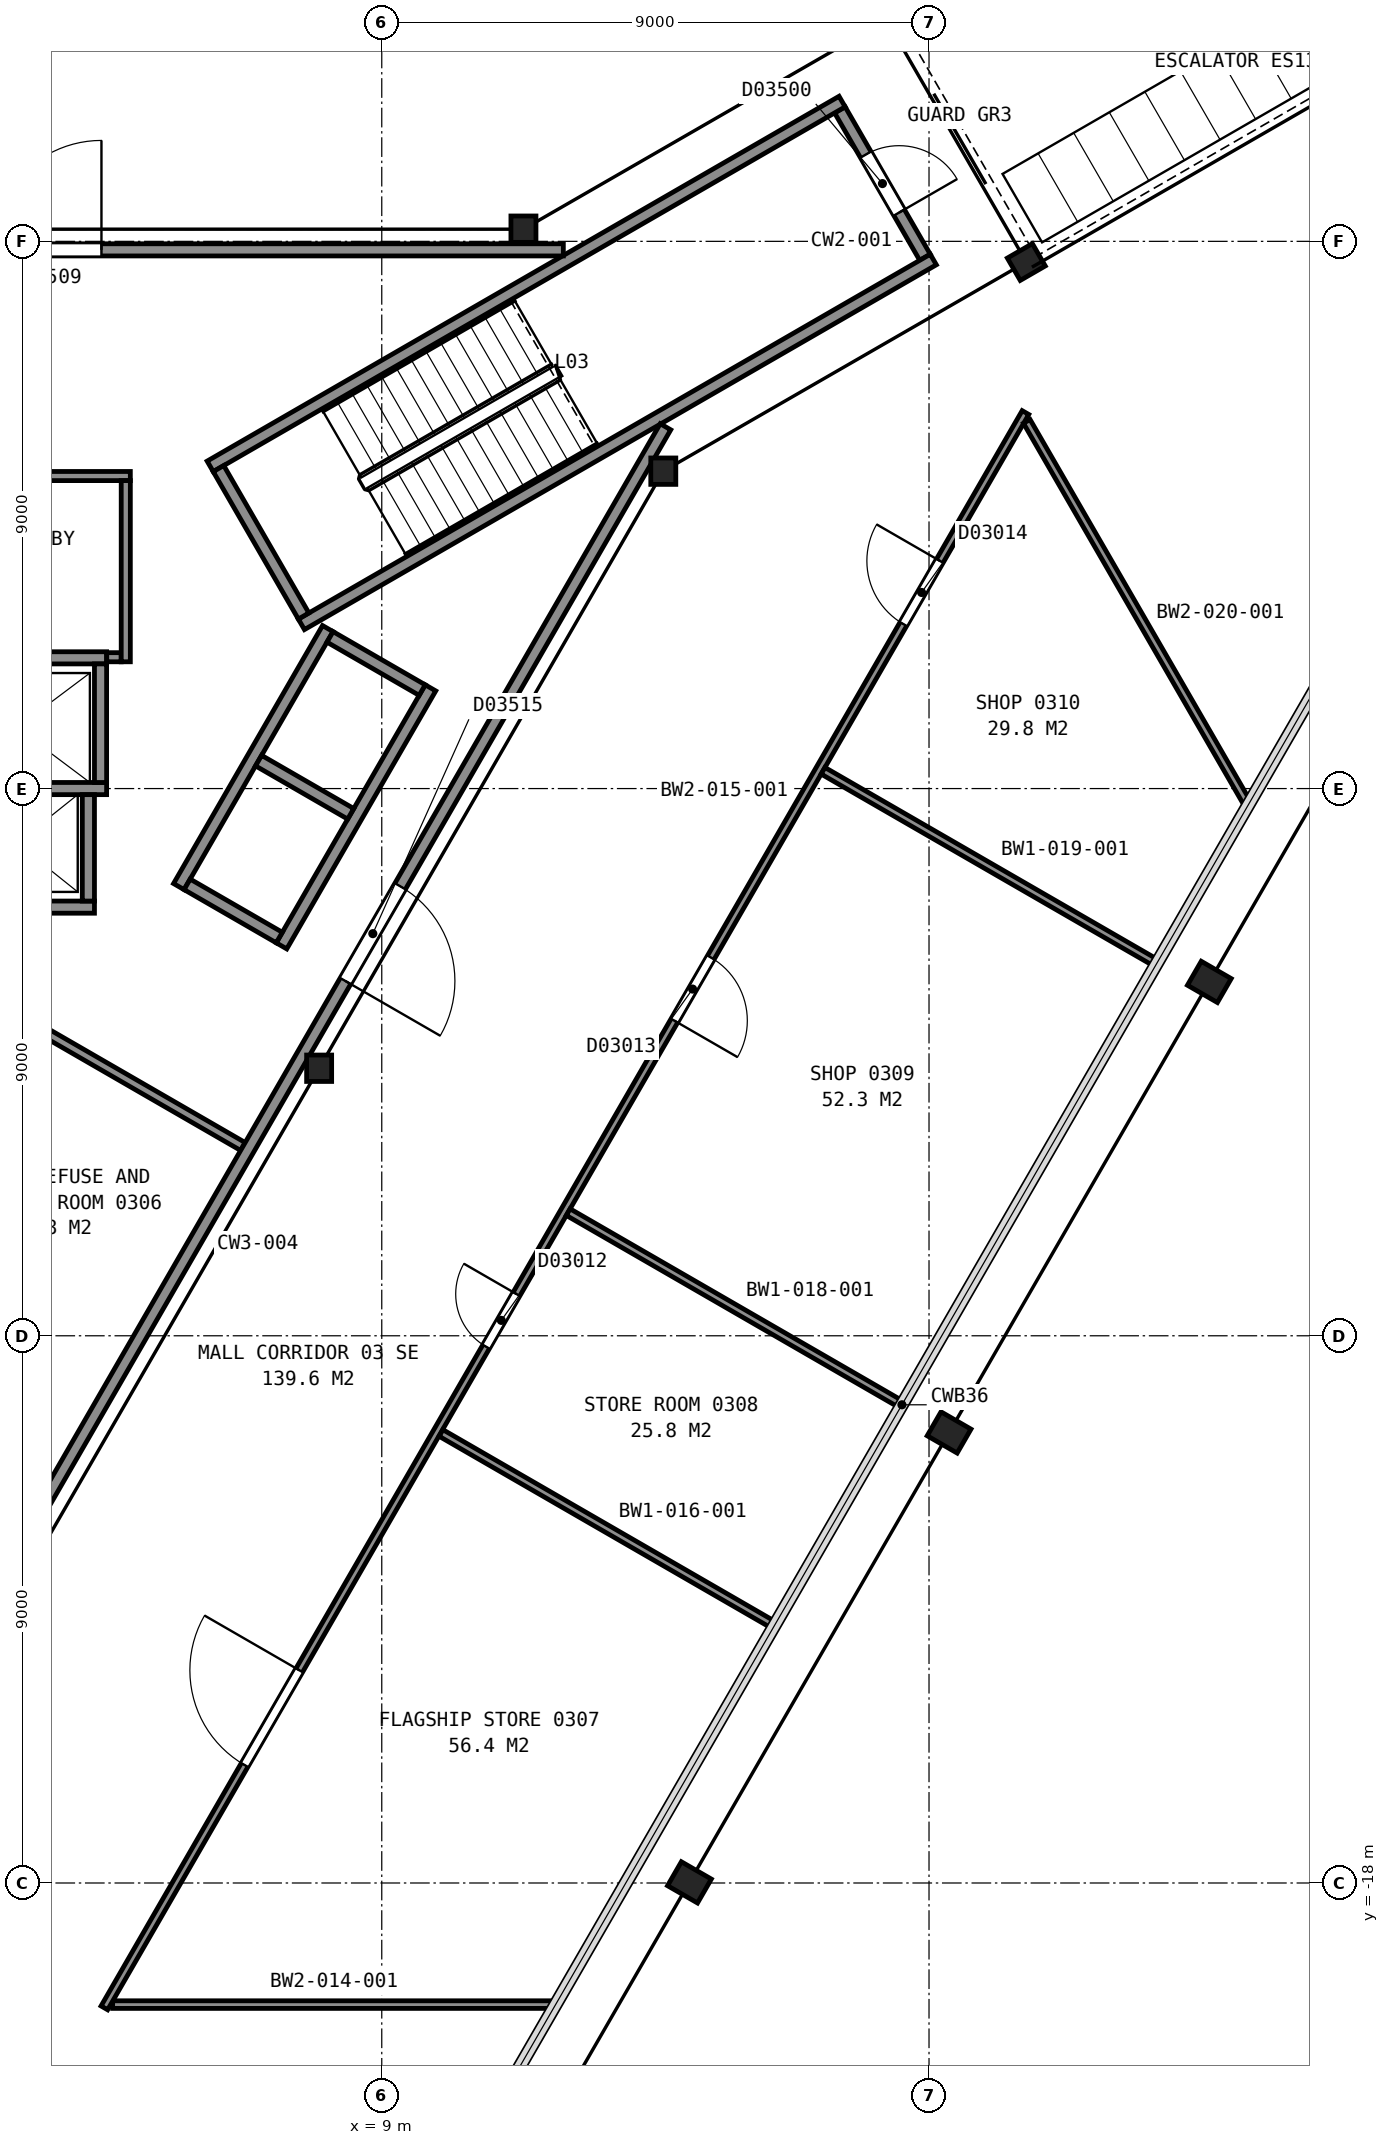
"""IFC4 building model, lengths in metres.
Left out: names, types, materials, properties, quantities, classifications, styles, units other than length and angle.
Written with IfcOpenShell. Run it as: python <this file> out.ifc"""

import sys

from ifc_helpers import new_model, si_unit, direction, frame, frame_2d, origin, origin_2d, place, context, subcontext, project, spatial, rectangle, i_section, extrude, element, fill, save


model = new_model("IFC4")
c1 = context("Model", 3, precision=1e-05, world=origin(), true_north=direction((0.0, 1.0)))
c2 = subcontext(c1, "Body", "Model", "MODEL_VIEW")
j1 = project(units=[si_unit("LENGTHUNIT", "METRE"), si_unit("PLANEANGLEUNIT", "RADIAN")], contexts=[c1])
p1 = place(None, origin())
s1 = spatial("IfcSite", under=j1, at=p1, CompositionType="ELEMENT")
p2 = place(p1, origin())
s2 = spatial("IfcBuilding", under=s1, at=p2, CompositionType="ELEMENT")
p3 = place(p2, frame((0.0, 0.0, 22.4)))
s3 = spatial("IfcBuildingStorey", under=s2, at=p3, CompositionType="ELEMENT", Elevation=22.4)
for number, where, z_axis, x_axis in (
    (1, (14.06, -17.99, 0.0), (0.0, 0.0, 1.0), (-0.5, -0.866, 0.0)),
    (2, (18.33, -10.59, 0.0), (0.0, 0.0, 1.0), (-0.5, -0.866, 0.0)),
    (3, (22.61, -3.18, 0.0), (0.0, 0.0, 1.0), (-0.5, -0.866, 0.0)),
):
    element("IfcColumn", number, at=place(p3, frame(where, z_axis=z_axis, x_axis=x_axis)), inside=s3, PredefinedType="COLUMN", context=c2, shape_type="SweptSolid", body=[
        extrude(i_section(OverallWidth=0.455, OverallDepth=0.569, WebThickness=0.078, FlangeThickness=0.125, FilletRadius=0.015, at=origin_2d()), origin(), (0.0, 0.0, 1.0), 4.8),
    ])
p4 = place(p3, frame((13.63, 5.22, 0.0), z_axis=(0.0, 0.0, 1.0), x_axis=(1.0, 0.0, 0.0)))
e4 = element("IfcColumn", 4, at=p4, inside=s3, PredefinedType="COLUMN", context=c2, shape_type="SweptSolid", body=[
    extrude(i_section(OverallWidth=0.411, OverallDepth=0.434, WebThickness=0.036, FlangeThickness=0.057, FilletRadius=0.015, at=origin_2d()), origin(), (0.0, 0.0, 1.0), 4.8),
])
p5 = place(p3, frame((19.6, 8.66, 0.0), z_axis=(0.0, 0.0, 1.0), x_axis=(0.5, -0.866025403784, 0.0)))
e5 = element("IfcColumn", 5, at=p5, inside=s3, PredefinedType="COLUMN", context=c2, shape_type="SweptSolid", body=[
    extrude(i_section(OverallWidth=0.424, OverallDepth=0.475, WebThickness=0.048, FlangeThickness=0.077, FilletRadius=0.015, at=origin_2d()), origin(), (0.0, 0.0, 1.0), 4.8),
])
for number, where, z_axis, x_axis in (
    (6, (11.33, 9.2, 0.0), (0.0, 0.0, 1.0), (1.0, 0.0, 0.0)),
    (7, (7.97, -4.6, 0.0), (0.0, 0.0, 1.0), (1.0, 0.0, 0.0)),
):
    element("IfcColumn", number, at=place(p3, frame(where, z_axis=z_axis, x_axis=x_axis)), inside=s3, PredefinedType="COLUMN", context=c2, shape_type="SweptSolid", body=[
        extrude(i_section(OverallWidth=0.411, OverallDepth=0.434, WebThickness=0.036, FlangeThickness=0.057, FilletRadius=0.015, at=origin_2d()), origin(), (0.0, 0.0, 1.0), 4.8),
    ])
p6 = place(p3, frame((17.934, 8.738, 0.0), z_axis=(0.0, 0.0, 1.0), x_axis=(-0.49998411664, 0.866034573852, 0.0)))
e8 = element("IfcWall", 8, at=p6, inside=s3, PredefinedType="PARTITIONING", context=c2, shape_type="SweptSolid", body=[
    extrude(rectangle(XDim=2.8, YDim=0.2, at=frame_2d((1.4, 0.0))), origin(), (0.0, 0.0, 1.0), 4.55),
])
p7 = place(p6, frame((0.85, 0.0, 0.0)))
e9 = element("IfcOpeningElement", 9, at=p7, cuts=e8, PredefinedType="OPENING", context=c2, shape_type="SweptSolid", body=[
    extrude(rectangle(XDim=1.1, YDim=2.1, at=frame_2d((0.55, 1.05))), frame((0.0, 0.11, 0.0), z_axis=(0.0, -1.0, 0.0), x_axis=(1.0, 0.0, 0.0)), (0.0, 0.0, 1.0), 0.22),
])
for number, where, z_axis, x_axis in (
    (10, (6.178, 5.299, 0.0), (0.0, 0.0, 1.0), (0.866, 0.5, 0.0)),
    (11, (7.678, 2.701, 0.0), (0.0, 0.0, 1.0), (0.866, 0.5, 0.0)),
):
    element("IfcWall", number, at=place(p3, frame(where, z_axis=z_axis, x_axis=x_axis)), inside=s3, PredefinedType="PARTITIONING", context=c2, shape_type="SweptSolid", body=[
        extrude(rectangle(XDim=12.0, YDim=0.2, at=frame_2d((6.0, 0.0))), origin(), (0.0, 0.0, 1.0), 4.55),
    ])
p8 = place(p3, frame((7.715, 2.838, 0.0), z_axis=(0.0, 0.0, 1.0), x_axis=(-0.500049511043, 0.865996816683, 0.0)))
e12 = element("IfcWall", 12, at=p8, inside=s3, PredefinedType="PARTITIONING", context=c2, shape_type="SweptSolid", body=[
    extrude(rectangle(XDim=2.8, YDim=0.2, at=frame_2d((1.4, 0.0))), origin(), (0.0, 0.0, 1.0), 4.55),
])
p9 = place(p3, frame((1.725, -1.95, 0.0), z_axis=(0.0, 0.0, 1.0), x_axis=(1.0, 0.0, 0.0)))
e13 = element("IfcWall", 13, at=p9, inside=s3, PredefinedType="PARTITIONING", context=c2, shape_type="SweptSolid", body=[
    extrude(rectangle(XDim=2.55, YDim=0.2, at=frame_2d((1.275, 0.0))), origin(), (0.0, 0.0, 1.0), 4.8),
])
p10 = place(p9, frame((0.725, 0.0, 0.0)))
e14 = element("IfcOpeningElement", 14, at=p10, cuts=e13, PredefinedType="OPENING", context=c2, shape_type="SweptSolid", body=[
    extrude(rectangle(XDim=1.1, YDim=2.1, at=frame_2d((0.55, 1.05))), frame((0.0, 0.11, 0.0), z_axis=(0.0, -1.0, 0.0), x_axis=(1.0, 0.0, 0.0)), (0.0, 0.0, 1.0), 0.22),
])
p11 = place(p3, frame((1.525, 0.0, 0.0), z_axis=(0.0, 0.0, 1.0), x_axis=(1.0, 0.0, 0.0)))
e15 = element("IfcWall", 15, at=p11, inside=s3, PredefinedType="PARTITIONING", context=c2, shape_type="SweptSolid", body=[
    extrude(rectangle(XDim=2.95, YDim=0.2, at=frame_2d((1.475, 0.0))), origin(), (0.0, 0.0, 1.0), 4.8),
])
p12 = place(p3, frame((1.525, 2.15, 0.0), z_axis=(0.0, 0.0, 1.0), x_axis=(1.0, 0.0, 0.0)))
e16 = element("IfcWall", 16, at=p12, inside=s3, PredefinedType="PARTITIONING", context=c2, shape_type="SweptSolid", body=[
    extrude(rectangle(XDim=2.95, YDim=0.2, at=frame_2d((1.475, 0.0))), origin(), (0.0, 0.0, 1.0), 4.8),
])
p13 = place(p12, frame((0.925, 0.0, 0.0)))
e17 = element("IfcOpeningElement", 17, at=p13, cuts=e16, PredefinedType="OPENING", context=c2, shape_type="SweptSolid", body=[
    extrude(rectangle(XDim=1.1, YDim=2.1, at=frame_2d((0.55, 1.05))), frame((0.0, 0.11, 0.0), z_axis=(0.0, -1.0, 0.0), x_axis=(1.0, 0.0, 0.0)), (0.0, 0.0, 1.0), 0.22),
])
p14 = place(p3, frame((7.351, -2.587, 0.0), z_axis=(0.0, 0.0, 1.0), x_axis=(0.500002801628, 0.866023786258, 0.0)))
e18 = element("IfcWall", 18, at=p14, inside=s3, PredefinedType="PARTITIONING", context=c2, shape_type="SweptSolid", body=[
    extrude(rectangle(XDim=4.9, YDim=0.2, at=frame_2d((2.45, 0.0))), origin(), (0.0, 0.0, 1.0), 4.8),
])
p15 = place(p3, frame((5.663, -1.612, 0.0), z_axis=(0.0, 0.0, 1.0), x_axis=(0.49998122708, 0.866036242063, 0.0)))
e19 = element("IfcWall", 19, at=p15, inside=s3, PredefinedType="PARTITIONING", context=c2, shape_type="SweptSolid", body=[
    extrude(rectangle(XDim=4.9, YDim=0.2, at=frame_2d((2.45, 0.0))), origin(), (0.0, 0.0, 1.0), 4.8),
])
p16 = place(p3, frame((4.375, 0.1, 0.0), z_axis=(0.0, 0.0, 1.0), x_axis=(0.0, 1.0, 0.0)))
e20 = element("IfcWall", 20, at=p16, inside=s3, PredefinedType="PARTITIONING", context=c2, shape_type="SweptSolid", body=[
    extrude(rectangle(XDim=1.95, YDim=0.2, at=frame_2d((0.975, 0.0))), origin(), (0.0, 0.0, 1.0), 4.8),
])
p17 = place(p3, frame((4.175, -1.85, 0.0), z_axis=(0.0, 0.0, 1.0), x_axis=(0.0, 1.0, 0.0)))
e21 = element("IfcWall", 21, at=p17, inside=s3, PredefinedType="PARTITIONING", context=c2, shape_type="SweptSolid", body=[
    extrude(rectangle(XDim=1.75, YDim=0.2, at=frame_2d((0.875, 0.0))), origin(), (0.0, 0.0, 1.0), 4.8),
])
p18 = place(p3, frame((9.665, 1.62, 0.0), z_axis=(0.0, 0.0, 1.0), x_axis=(-0.866002029911, 0.500040482552, 0.0)))
e22 = element("IfcWall", 22, at=p18, inside=s3, PredefinedType="PARTITIONING", context=c2, shape_type="SweptSolid", body=[
    extrude(rectangle(XDim=1.75, YDim=0.2, at=frame_2d((0.875, 0.0))), origin(), (0.0, 0.0, 1.0), 4.8),
])
for number, where, z_axis, x_axis in (
    (23, (8.49, -0.416, 0.0), (0.0, 0.0, 1.0), (-0.866, 0.5, 0.0)),
    (24, (7.315, -2.451, 0.0), (0.0, 0.0, 1.0), (-0.866, 0.5, 0.0)),
):
    element("IfcWall", number, at=place(p3, frame(where, z_axis=z_axis, x_axis=x_axis)), inside=s3, PredefinedType="PARTITIONING", context=c2, shape_type="SweptSolid", body=[
        extrude(rectangle(XDim=1.75, YDim=0.2, at=frame_2d((0.875, 0.0))), origin(), (0.0, 0.0, 1.0), 4.8),
    ])
p19 = place(p3, frame((11.986, 8.86, 0.0), z_axis=(0.0, 0.0, 1.0), x_axis=(-1.0, 0.0, 0.0)))
e25 = element("IfcWall", 25, at=p19, inside=s3, PredefinedType="PARTITIONING", context=c2, shape_type="SweptSolid", body=[
    extrude(rectangle(XDim=23.967, YDim=0.2, at=frame_2d((11.983, 0.0))), origin(), (0.0, 0.0, 1.0), 4.55),
])
p20 = place(p19, frame((7.596, 0.0, 0.0)))
e26 = element("IfcOpeningElement", 26, at=p20, cuts=e25, PredefinedType="OPENING", context=c2, shape_type="SweptSolid", body=[
    extrude(rectangle(XDim=1.8, YDim=2.1, at=frame_2d((0.9, 1.05))), frame((0.0, 0.11, 0.0), z_axis=(0.0, -1.0, 0.0), x_axis=(1.0, 0.0, 0.0)), (0.0, 0.0, 1.0), 0.22),
])
p21 = place(p3, frame((-0.245, 5.14, 0.0), z_axis=(0.0, 0.0, 1.0), x_axis=(1.0, 0.0, 0.0)))
e27 = element("IfcWall", 27, at=p21, inside=s3, PredefinedType="PARTITIONING", context=c2, shape_type="SweptSolid", body=[
    extrude(rectangle(XDim=5.11, YDim=0.15, at=frame_2d((2.555, 0.0))), origin(), (0.0, 0.0, 1.0), 4.55),
])
p22 = place(p21, frame((1.975, 0.0, 0.0)))
e28 = element("IfcOpeningElement", 28, at=p22, cuts=e27, PredefinedType="OPENING", context=c2, shape_type="SweptSolid", body=[
    extrude(rectangle(XDim=1.0, YDim=2.1, at=frame_2d((0.5, 1.05))), frame((0.0, 0.085, 0.0), z_axis=(0.0, -1.0, 0.0), x_axis=(1.0, 0.0, 0.0)), (0.0, 0.0, 1.0), 0.17),
])
p23 = place(p3, frame((2.777, -3.613, 0.0), z_axis=(0.0, 0.0, 1.0), x_axis=(0.866014865915, -0.500018251681, 0.0)))
e29 = element("IfcWall", 29, at=p23, inside=s3, PredefinedType="PARTITIONING", context=c2, shape_type="SweptSolid", body=[
    extrude(rectangle(XDim=4.549, YDim=0.15, at=frame_2d((2.274, 0.0))), origin(), (0.0, 0.0, 1.0), 4.55),
])
p24 = place(p3, frame((3.403, -11.826, 0.0), z_axis=(0.0, 0.0, 1.0), x_axis=(0.499990831429, 0.866030697196, 0.0)))
e30 = element("IfcWall", 30, at=p24, inside=s3, PredefinedType="PARTITIONING", context=c2, shape_type="SweptSolid", body=[
    extrude(rectangle(XDim=20.526, YDim=0.2, at=frame_2d((10.263, 0.0))), origin(), (0.0, 0.0, 1.0), 4.55),
])
p25 = place(p24, frame((10.0, 0.0, 0.0)))
e31 = element("IfcOpeningElement", 31, at=p25, cuts=e30, PredefinedType="OPENING", context=c2, shape_type="SweptSolid", body=[
    extrude(rectangle(XDim=1.8, YDim=2.1, at=frame_2d((0.9, 1.05))), frame((0.0, 0.11, 0.0), z_axis=(0.0, -1.0, 0.0), x_axis=(1.0, 0.0, 0.0)), (0.0, 0.0, 1.0), 0.22),
])
p26 = place(p3, frame((4.477, 2.16, 0.0), z_axis=(0.0, 0.0, 1.0), x_axis=(1.0, 0.0, 0.0)))
e32 = element("IfcWall", 32, at=p26, inside=s3, PredefinedType="PARTITIONING", context=c2, shape_type="SweptSolid", body=[
    extrude(rectangle(XDim=0.238, YDim=0.15, at=frame_2d((0.119, 0.0))), origin(), (0.0, 0.0, 1.0), 4.55),
])
p27 = place(p3, frame((4.79, 2.085, 0.0), z_axis=(0.0, 0.0, 1.0), x_axis=(0.0, 1.0, 0.0)))
e33 = element("IfcWall", 33, at=p27, inside=s3, PredefinedType="PARTITIONING", context=c2, shape_type="SweptSolid", body=[
    extrude(rectangle(XDim=2.98, YDim=0.15, at=frame_2d((1.49, 0.0))), origin(), (0.0, 0.0, 1.0), 4.55),
])
p28 = place(p3, frame((4.574, -20.0, 0.0), z_axis=(0.0, 0.0, 1.0), x_axis=(1.0, 0.0, 0.0)))
e34 = element("IfcWall", 34, at=p28, inside=s3, PredefinedType="PARTITIONING", context=c2, shape_type="SweptSolid", body=[
    extrude(rectangle(XDim=7.285, YDim=0.125, at=frame_2d((3.643, 0.0))), origin(), (0.0, 0.0, 1.0), 4.64),
])
p29 = place(p3, frame((19.586, 6.184, 0.0), z_axis=(0.0, 0.0, 1.0), x_axis=(-0.499994028088, -0.866028851642, 0.0)))
e35 = element("IfcWall", 35, at=p29, inside=s3, PredefinedType="PARTITIONING", context=c2, shape_type="SweptSolid", body=[
    extrude(rectangle(XDim=30.297, YDim=0.125, at=frame_2d((15.148, 0.0))), origin(), (0.0, 0.0, 1.0), 3.653),
])
p30 = place(p29, frame((23.885, 0.0, 0.0)))
e36 = element("IfcOpeningElement", 36, at=p30, cuts=e35, PredefinedType="OPENING", context=c2, shape_type="SweptSolid", body=[
    extrude(rectangle(XDim=1.8, YDim=2.4, at=frame_2d((0.9, 1.2))), frame((0.0, 0.073, 0.0), z_axis=(0.0, -1.0, 0.0), x_axis=(1.0, 0.0, 0.0)), (0.0, 0.0, 1.0), 0.145),
])
p31 = place(p29, frame((16.741, 0.0, 0.0)))
e37 = element("IfcOpeningElement", 37, at=p31, cuts=e35, PredefinedType="OPENING", context=c2, shape_type="SweptSolid", body=[
    extrude(rectangle(XDim=1.0, YDim=2.1, at=frame_2d((0.5, 1.05))), frame((0.0, 0.073, 0.0), z_axis=(0.0, -1.0, 0.0), x_axis=(1.0, 0.0, 0.0)), (0.0, 0.0, 1.0), 0.145),
])
p32 = place(p29, frame((10.349, 0.0, 0.0)))
e38 = element("IfcOpeningElement", 38, at=p32, cuts=e35, PredefinedType="OPENING", context=c2, shape_type="SweptSolid", body=[
    extrude(rectangle(XDim=1.2, YDim=2.1, at=frame_2d((0.6, 1.05))), frame((0.0, 0.073, 0.0), z_axis=(0.0, -1.0, 0.0), x_axis=(1.0, 0.0, 0.0)), (0.0, 0.0, 1.0), 0.145),
])
p33 = place(p29, frame((2.817, 0.0, 0.0)))
e39 = element("IfcOpeningElement", 39, at=p33, cuts=e35, PredefinedType="OPENING", context=c2, shape_type="SweptSolid", body=[
    extrude(rectangle(XDim=1.2, YDim=2.1, at=frame_2d((0.6, 1.05))), frame((0.0, 0.073, 0.0), z_axis=(0.0, -1.0, 0.0), x_axis=(1.0, 0.0, 0.0)), (0.0, 0.0, 1.0), 0.145),
])
p34 = place(p3, frame((9.974, -10.599, 0.0), z_axis=(0.0, 0.0, 1.0), x_axis=(0.866044997331, -0.499966061446, 0.0)))
e40 = element("IfcWall", 40, at=p34, inside=s3, PredefinedType="PARTITIONING", context=c2, shape_type="SweptSolid", body=[
    extrude(rectangle(XDim=6.333, YDim=0.125, at=frame_2d((3.167, 0.0))), origin(), (0.0, 0.0, 1.0), 4.64),
])
p35 = place(p3, frame((12.066, -6.966, 0.0), z_axis=(0.0, 0.0, 1.0), x_axis=(0.866003371142, -0.500038159714, 0.0)))
e41 = element("IfcWall", 41, at=p35, inside=s3, PredefinedType="PARTITIONING", context=c2, shape_type="SweptSolid", body=[
    extrude(rectangle(XDim=6.337, YDim=0.125, at=frame_2d((3.168, 0.0))), origin(), (0.0, 0.0, 1.0), 3.653),
])
p36 = place(p3, frame((16.257, 0.293, 0.0), z_axis=(0.0, 0.0, 1.0), x_axis=(0.866118237319, -0.499839173118, 0.0)))
e42 = element("IfcWall", 42, at=p36, inside=s3, PredefinedType="PARTITIONING", context=c2, shape_type="SweptSolid", body=[
    extrude(rectangle(XDim=6.337, YDim=0.125, at=frame_2d((3.169, 0.0))), origin(), (0.0, 0.0, 1.0), 3.653),
])
p37 = place(p3, frame((19.607, 6.039, 0.0), z_axis=(0.0, 0.0, 1.0), x_axis=(0.500002873931, -0.866023744513, 0.0)))
e43 = element("IfcWall", 43, at=p37, inside=s3, PredefinedType="PARTITIONING", context=c2, shape_type="SweptSolid", body=[
    extrude(rectangle(XDim=7.285, YDim=0.125, at=frame_2d((3.643, 0.0))), origin(), (0.0, 0.0, 1.0), 4.64),
])
p38 = place(p7, origin())
e44 = element("IfcDoor", 44, at=p38, inside=s3, OperationType="SINGLE_SWING_LEFT", PredefinedType="DOOR", context=c2, shape_type="SweptSolid", body=[
    extrude(rectangle(XDim=1.1, YDim=2.1, at=frame_2d((0.55, 1.05))), frame((0.0, 0.025, 0.0), z_axis=(0.0, -1.0, 0.0), x_axis=(1.0, 0.0, 0.0)), (0.0, 0.0, 1.0), 0.05),
])
fill(e9, e44)
p39 = place(p20, origin())
e45 = element("IfcDoor", 45, at=p39, inside=s3, OperationType="DOUBLE_DOOR_SINGLE_SWING", PredefinedType="DOOR", context=c2, shape_type="SweptSolid", body=[
    extrude(rectangle(XDim=1.8, YDim=2.1, at=frame_2d((0.9, 1.05))), frame((0.0, 0.025, 0.0), z_axis=(0.0, -1.0, 0.0), x_axis=(1.0, 0.0, 0.0)), (0.0, 0.0, 1.0), 0.05),
])
fill(e26, e45)
p40 = place(p25, origin())
e46 = element("IfcDoor", 46, at=p40, inside=s3, OperationType="DOUBLE_DOOR_SINGLE_SWING", PredefinedType="DOOR", context=c2, shape_type="SweptSolid", body=[
    extrude(rectangle(XDim=1.8, YDim=2.1, at=frame_2d((0.9, 1.05))), frame((0.0, 0.025, 0.0), z_axis=(0.0, -1.0, 0.0), x_axis=(1.0, 0.0, 0.0)), (0.0, 0.0, 1.0), 0.05),
])
fill(e31, e46)
p41 = place(p30, origin())
e47 = element("IfcDoor", 47, at=p41, inside=s3, OperationType="DOUBLE_DOOR_SINGLE_SWING", PredefinedType="DOOR", context=c2, shape_type="SweptSolid", body=[
    extrude(rectangle(XDim=1.8, YDim=2.4, at=frame_2d((0.9, 1.2))), frame((0.0, 0.025, 0.0), z_axis=(0.0, -1.0, 0.0), x_axis=(1.0, 0.0, 0.0)), (0.0, 0.0, 1.0), 0.05),
])
fill(e36, e47)
p42 = place(p31, origin())
e48 = element("IfcDoor", 48, at=p42, inside=s3, OperationType="SINGLE_SWING_LEFT", PredefinedType="DOOR", context=c2, shape_type="SweptSolid", body=[
    extrude(rectangle(XDim=1.0, YDim=2.1, at=frame_2d((0.5, 1.05))), frame((0.0, 0.025, 0.0), z_axis=(0.0, -1.0, 0.0), x_axis=(1.0, 0.0, 0.0)), (0.0, 0.0, 1.0), 0.05),
])
fill(e37, e48)
p43 = place(p32, origin())
e49 = element("IfcDoor", 49, at=p43, inside=s3, OperationType="SINGLE_SWING_RIGHT", PredefinedType="DOOR", context=c2, shape_type="SweptSolid", body=[
    extrude(rectangle(XDim=1.2, YDim=2.1, at=frame_2d((0.6, 1.05))), frame((0.0, 0.025, 0.0), z_axis=(0.0, -1.0, 0.0), x_axis=(1.0, 0.0, 0.0)), (0.0, 0.0, 1.0), 0.05),
])
fill(e38, e49)
p44 = place(p33, origin())
e50 = element("IfcDoor", 50, at=p44, inside=s3, OperationType="SINGLE_SWING_LEFT", PredefinedType="DOOR", context=c2, shape_type="SweptSolid", body=[
    extrude(rectangle(XDim=1.2, YDim=2.1, at=frame_2d((0.6, 1.05))), frame((0.0, 0.025, 0.0), z_axis=(0.0, -1.0, 0.0), x_axis=(1.0, 0.0, 0.0)), (0.0, 0.0, 1.0), 0.05),
])
fill(e39, e50)
save(model, sys.argv[1])
